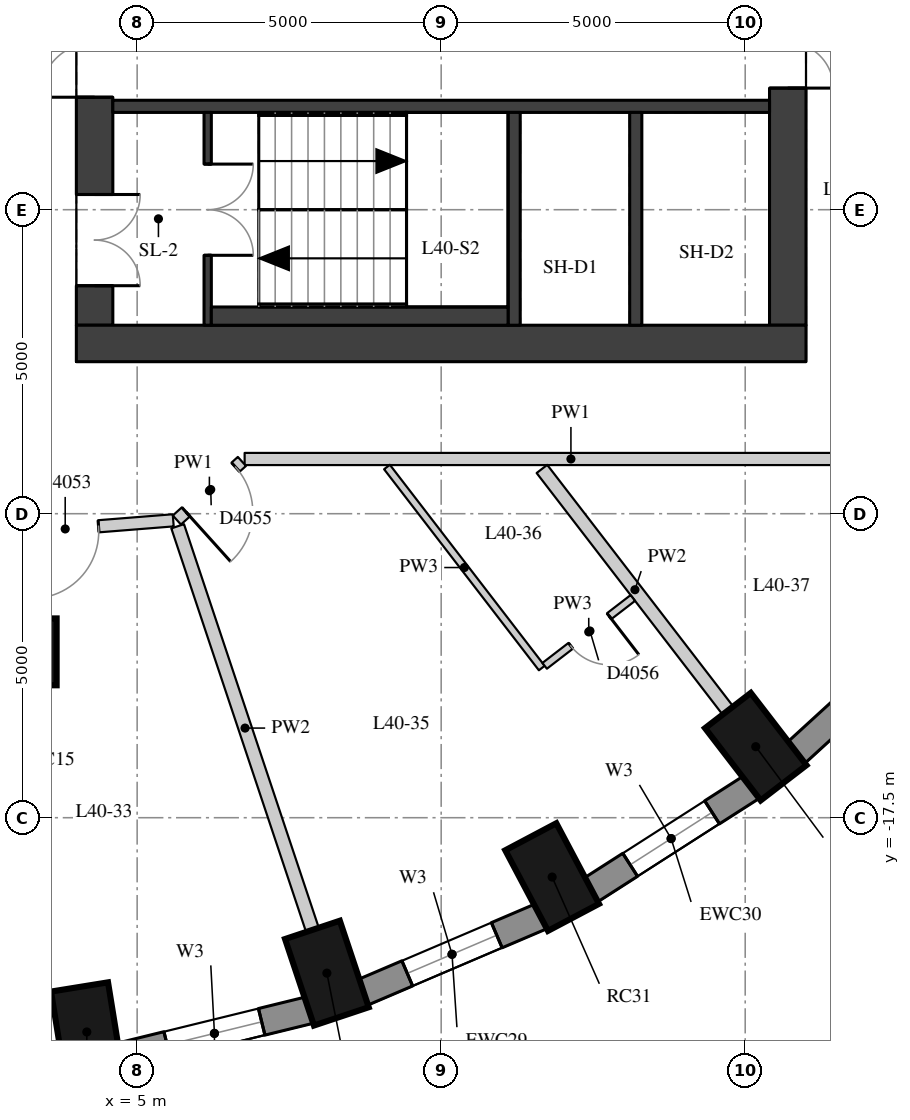
"""IFC4 building model, lengths in metres.
Left out: names, types, materials, properties, quantities, classifications, styles, units other than length and angle.
Written with IfcOpenShell. Run it as: python <this file> out.ifc"""

import sys

from ifc_helpers import new_model, si_unit, direction, frame, frame_2d, origin, origin_2d, place, context, subcontext, project, spatial, rectangle, extrude, element, fill, save


model = new_model("IFC4")
c1 = context("Model", 3, precision=1e-05, world=origin(), true_north=direction((0.0, 1.0)))
c2 = subcontext(c1, "Body", "Model", "MODEL_VIEW")
j1 = project(units=[si_unit("LENGTHUNIT", "METRE"), si_unit("PLANEANGLEUNIT", "RADIAN")], contexts=[c1])
p1 = place(None, origin())
s1 = spatial("IfcSite", under=j1, at=p1, CompositionType="ELEMENT")
p2 = place(p1, origin())
s2 = spatial("IfcBuilding", under=s1, at=p2, CompositionType="ELEMENT")
p3 = place(p2, frame((0.0, 0.0, 145.1)))
s3 = spatial("IfcBuildingStorey", under=s2, at=p3, CompositionType="ELEMENT", Elevation=145.1)
for number, where, z_axis, x_axis in (
    (1, (4.172, -21.024, 0.0), (0.0, 0.0, 1.0), (0.16, -0.987, 0.0)),
    (2, (8.12, -20.056, 0.0), (0.0, 0.0, 1.0), (0.317, -0.949, 0.0)),
    (3, (11.825, -18.476, 0.0), (0.0, 0.0, 1.0), (0.468, -0.884, 0.0)),
    (4, (15.173, -16.332, 0.0), (0.0, 0.0, 1.0), (0.61, -0.792, 0.0)),
):
    element("IfcColumn", number, at=place(p3, frame(where, z_axis=z_axis, x_axis=x_axis)), inside=s3, PredefinedType="COLUMN", context=c2, shape_type="SweptSolid", body=[
        extrude(rectangle(XDim=1.5, YDim=0.95, at=origin_2d()), origin(), (0.0, 0.0, 1.0), 3.3),
    ])
p4 = place(p3, frame((3.126, -14.772, 0.0), z_axis=(0.0, 0.0, 1.0), x_axis=(1.0, 0.0, 0.0)))
e5 = element("IfcColumn", 5, at=p4, inside=s3, PredefinedType="COLUMN", context=c2, shape_type="SweptSolid", body=[
    extrude(rectangle(XDim=1.1, YDim=1.1, at=origin_2d()), origin(), (0.0, 0.0, 1.0), 3.3),
])
p5 = place(p3, frame((4.699, -21.433, 0.0), z_axis=(0.0, 0.0, 1.0), x_axis=(0.971237178372, 0.238114139328, 0.0)))
e6 = element("IfcWall", 6, at=p5, inside=s3, PredefinedType="SOLIDWALL", context=c2, shape_type="SweptSolid", body=[
    extrude(rectangle(XDim=3.237, YDim=0.45, at=frame_2d((1.618, 0.0))), origin(), (0.0, 0.0, 1.0), 3.02),
])
p6 = place(p5, frame((0.818, 0.0, 0.4)))
e7 = element("IfcOpeningElement", 7, at=p6, cuts=e6, PredefinedType="OPENING", context=c2, shape_type="SweptSolid", body=[
    extrude(rectangle(XDim=1.6, YDim=1.75, at=frame_2d((0.8, 0.875))), frame((0.0, 0.235, 0.0), z_axis=(0.0, -1.0, 0.0), x_axis=(1.0, 0.0, 0.0)), (0.0, 0.0, 1.0), 0.47),
])
p7 = place(p3, frame((8.706, -20.375, 0.0), z_axis=(0.0, 0.0, 1.0), x_axis=(0.91981046949, 0.392362969986, 0.0)))
e8 = element("IfcWall", 8, at=p7, inside=s3, PredefinedType="SOLIDWALL", context=c2, shape_type="SweptSolid", body=[
    extrude(rectangle(XDim=3.201, YDim=0.45, at=frame_2d((1.6, 0.0))), origin(), (0.0, 0.0, 1.0), 3.02),
])
p8 = place(p7, frame((0.8, 0.0, 0.4)))
e9 = element("IfcOpeningElement", 9, at=p8, cuts=e8, PredefinedType="OPENING", context=c2, shape_type="SweptSolid", body=[
    extrude(rectangle(XDim=1.6, YDim=1.75, at=frame_2d((0.8, 0.875))), frame((0.0, 0.235, 0.0), z_axis=(0.0, -1.0, 0.0), x_axis=(1.0, 0.0, 0.0)), (0.0, 0.0, 1.0), 0.47),
])
p9 = place(p3, frame((12.455, -18.693, 0.0), z_axis=(0.0, 0.0, 1.0), x_axis=(0.842065914439, 0.539374633943, 0.0)))
e10 = element("IfcWall", 10, at=p9, inside=s3, PredefinedType="SOLIDWALL", context=c2, shape_type="SweptSolid", body=[
    extrude(rectangle(XDim=3.151, YDim=0.45, at=frame_2d((1.576, 0.0))), origin(), (0.0, 0.0, 1.0), 3.02),
])
p10 = place(p9, frame((0.776, 0.0, 0.4)))
e11 = element("IfcOpeningElement", 11, at=p10, cuts=e10, PredefinedType="OPENING", context=c2, shape_type="SweptSolid", body=[
    extrude(rectangle(XDim=1.6, YDim=1.75, at=frame_2d((0.8, 0.875))), frame((0.0, 0.235, 0.0), z_axis=(0.0, -1.0, 0.0), x_axis=(1.0, 0.0, 0.0)), (0.0, 0.0, 1.0), 0.47),
])
p11 = place(p3, frame((15.83, -16.439, 0.0), z_axis=(0.0, 0.0, 1.0), x_axis=(0.737808755941, 0.675009807082, 0.0)))
e12 = element("IfcWall", 12, at=p11, inside=s3, PredefinedType="SOLIDWALL", context=c2, shape_type="SweptSolid", body=[
    extrude(rectangle(XDim=3.094, YDim=0.45, at=frame_2d((1.547, 0.0))), origin(), (0.0, 0.0, 1.0), 3.02),
])
p12 = place(p3, frame((4.3, -9.4, 0.0), z_axis=(0.0, 0.0, 1.0), x_axis=(0.0, 1.0, 0.0)))
e13 = element("IfcWall", 13, at=p12, inside=s3, PredefinedType="SHEAR", context=c2, shape_type="SweptSolid", body=[
    extrude(rectangle(XDim=18.8, YDim=0.6, at=frame_2d((9.4, 0.0))), origin(), (0.0, 0.0, 1.0), 3.02),
])
p13 = place(p12, frame((0.65, 0.0, 0.0)))
e14 = element("IfcOpeningElement", 14, at=p13, cuts=e13, PredefinedType="OPENING", context=c2, shape_type="SweptSolid", body=[
    extrude(rectangle(XDim=1.5, YDim=2.1, at=frame_2d((0.75, 1.05))), frame((0.0, 0.31, 0.0), z_axis=(0.0, -1.0, 0.0), x_axis=(1.0, 0.0, 0.0)), (0.0, 0.0, 1.0), 0.62),
])
p14 = place(p12, frame((3.75, 0.0, 0.0)))
e15 = element("IfcOpeningElement", 15, at=p14, cuts=e13, PredefinedType="OPENING", context=c2, shape_type="SweptSolid", body=[
    extrude(rectangle(XDim=1.8, YDim=2.1, at=frame_2d((0.9, 1.05))), frame((0.0, 0.31, 0.0), z_axis=(0.0, -1.0, 0.0), x_axis=(1.0, 0.0, 0.0)), (0.0, 0.0, 1.0), 0.62),
])
p15 = place(p12, frame((6.25, 0.0, 0.0)))
e16 = element("IfcOpeningElement", 16, at=p15, cuts=e13, PredefinedType="OPENING", context=c2, shape_type="SweptSolid", body=[
    extrude(rectangle(XDim=1.1, YDim=2.1, at=frame_2d((0.55, 1.05))), frame((0.0, 0.31, 0.0), z_axis=(0.0, -1.0, 0.0), x_axis=(1.0, 0.0, 0.0)), (0.0, 0.0, 1.0), 0.62),
])
p16 = place(p12, frame((8.9, 0.0, 0.0)))
e17 = element("IfcOpeningElement", 17, at=p16, cuts=e13, PredefinedType="OPENING", context=c2, shape_type="SweptSolid", body=[
    extrude(rectangle(XDim=1.0, YDim=2.1, at=frame_2d((0.5, 1.05))), frame((0.0, 0.31, 0.0), z_axis=(0.0, -1.0, 0.0), x_axis=(1.0, 0.0, 0.0)), (0.0, 0.0, 1.0), 0.62),
])
p17 = place(p12, frame((11.45, 0.0, 0.0)))
e18 = element("IfcOpeningElement", 18, at=p17, cuts=e13, PredefinedType="OPENING", context=c2, shape_type="SweptSolid", body=[
    extrude(rectangle(XDim=1.1, YDim=2.1, at=frame_2d((0.55, 1.05))), frame((0.0, 0.31, 0.0), z_axis=(0.0, -1.0, 0.0), x_axis=(1.0, 0.0, 0.0)), (0.0, 0.0, 1.0), 0.62),
])
p18 = place(p12, frame((13.25, 0.0, 0.0)))
e19 = element("IfcOpeningElement", 19, at=p18, cuts=e13, PredefinedType="OPENING", context=c2, shape_type="SweptSolid", body=[
    extrude(rectangle(XDim=1.8, YDim=2.1, at=frame_2d((0.9, 1.05))), frame((0.0, 0.31, 0.0), z_axis=(0.0, -1.0, 0.0), x_axis=(1.0, 0.0, 0.0)), (0.0, 0.0, 1.0), 0.62),
])
p19 = place(p12, frame((16.65, 0.0, 0.0)))
e20 = element("IfcOpeningElement", 20, at=p19, cuts=e13, PredefinedType="OPENING", context=c2, shape_type="SweptSolid", body=[
    extrude(rectangle(XDim=1.5, YDim=2.1, at=frame_2d((0.75, 1.05))), frame((0.0, 0.31, 0.0), z_axis=(0.0, -1.0, 0.0), x_axis=(1.0, 0.0, 0.0)), (0.0, 0.0, 1.0), 0.62),
])
p20 = place(p3, frame((15.7, -9.4, 0.0), z_axis=(0.0, 0.0, 1.0), x_axis=(0.0, 1.0, 0.0)))
e21 = element("IfcWall", 21, at=p20, inside=s3, PredefinedType="SHEAR", context=c2, shape_type="SweptSolid", body=[
    extrude(rectangle(XDim=18.8, YDim=0.6, at=frame_2d((9.4, 0.0))), origin(), (0.0, 0.0, 1.0), 3.02),
])
p21 = place(p20, frame((13.4, 0.0, 0.0)))
e22 = element("IfcOpeningElement", 22, at=p21, cuts=e21, PredefinedType="OPENING", context=c2, shape_type="SweptSolid", body=[
    extrude(rectangle(XDim=1.5, YDim=2.1, at=frame_2d((0.75, 1.05))), frame((0.0, 0.31, 0.0), z_axis=(0.0, -1.0, 0.0), x_axis=(1.0, 0.0, 0.0)), (0.0, 0.0, 1.0), 0.62),
])
p22 = place(p20, frame((3.9, 0.0, 0.0)))
e23 = element("IfcOpeningElement", 23, at=p22, cuts=e21, PredefinedType="OPENING", context=c2, shape_type="SweptSolid", body=[
    extrude(rectangle(XDim=1.5, YDim=2.1, at=frame_2d((0.75, 1.05))), frame((0.0, 0.31, 0.0), z_axis=(0.0, -1.0, 0.0), x_axis=(1.0, 0.0, 0.0)), (0.0, 0.0, 1.0), 0.62),
])
p23 = place(p3, frame((4.0, -9.7, 0.0), z_axis=(0.0, 0.0, 1.0), x_axis=(1.0, 0.0, 0.0)))
e24 = element("IfcWall", 24, at=p23, inside=s3, PredefinedType="SHEAR", context=c2, shape_type="SweptSolid", body=[
    extrude(rectangle(XDim=12.0, YDim=0.6, at=frame_2d((6.0, 0.0))), origin(), (0.0, 0.0, 1.0), 3.02),
])
p24 = place(p3, frame((4.6, -5.8, 0.0), z_axis=(0.0, 0.0, 1.0), x_axis=(1.0, 0.0, 0.0)))
e25 = element("IfcWall", 25, at=p24, inside=s3, PredefinedType="SHEAR", context=c2, shape_type="SweptSolid", body=[
    extrude(rectangle(XDim=10.8, YDim=0.2, at=frame_2d((5.4, 0.0))), origin(), (0.0, 0.0, 1.0), 3.02),
])
for number, where, z_axis, x_axis in (
    (26, (11.2, -9.4, 0.0), (0.0, 0.0, 1.0), (0.0, 1.0, 0.0)),
    (27, (13.2, -9.4, 0.0), (0.0, 0.0, 1.0), (0.0, 1.0, 0.0)),
):
    element("IfcWall", number, at=place(p3, frame(where, z_axis=z_axis, x_axis=x_axis)), inside=s3, PredefinedType="SHEAR", context=c2, shape_type="SweptSolid", body=[
        extrude(rectangle(XDim=3.5, YDim=0.2, at=frame_2d((1.75, 0.0))), origin(), (0.0, 0.0, 1.0), 3.02),
    ])
p25 = place(p3, frame((6.16, -9.4, 0.0), z_axis=(0.0, 0.0, 1.0), x_axis=(0.0, 1.0, 0.0)))
e28 = element("IfcWall", 28, at=p25, inside=s3, PredefinedType="SHEAR", context=c2, shape_type="SweptSolid", body=[
    extrude(rectangle(XDim=3.5, YDim=0.12, at=frame_2d((1.75, 0.0))), origin(), (0.0, 0.0, 1.0), 3.02),
])
p26 = place(p25, frame((1.15, 0.0, 0.0)))
e29 = element("IfcOpeningElement", 29, at=p26, cuts=e28, PredefinedType="OPENING", context=c2, shape_type="SweptSolid", body=[
    extrude(rectangle(XDim=1.5, YDim=2.1, at=frame_2d((0.75, 1.05))), frame((0.0, 0.07, 0.0), z_axis=(0.0, -1.0, 0.0), x_axis=(1.0, 0.0, 0.0)), (0.0, 0.0, 1.0), 0.14),
])
p27 = place(p3, frame((6.22, -9.25, 0.0), z_axis=(0.0, 0.0, 1.0), x_axis=(1.0, 0.0, 0.0)))
e30 = element("IfcWall", 30, at=p27, inside=s3, PredefinedType="PARTITIONING", context=c2, shape_type="SweptSolid", body=[
    extrude(rectangle(XDim=4.88, YDim=0.3, at=frame_2d((2.44, 0.0))), origin(), (0.0, 0.0, 1.0), 3.02),
])
p28 = place(p3, frame((17.5, -11.6, 0.0), z_axis=(0.0, 0.0, 1.0), x_axis=(-1.0, 0.0, 0.0)))
e31 = element("IfcWall", 31, at=p28, inside=s3, PredefinedType="PARTITIONING", context=c2, shape_type="SweptSolid", body=[
    extrude(rectangle(XDim=10.732, YDim=0.2, at=frame_2d((5.366, 0.0))), origin(), (0.0, 0.0, 1.0), 3.02),
])
p29 = place(p3, frame((6.723, -11.64, 0.0), z_axis=(0.0, 0.0, 1.0), x_axis=(-0.743032656565, -0.669255161562, 0.0)))
e32 = element("IfcWall", 32, at=p29, inside=s3, PredefinedType="PARTITIONING", context=c2, shape_type="SweptSolid", body=[
    extrude(rectangle(XDim=1.439, YDim=0.2, at=frame_2d((0.72, 0.0))), origin(), (0.0, 0.0, 1.0), 3.02),
])
p30 = place(p29, frame((0.14, 0.0, 0.0)))
e33 = element("IfcOpeningElement", 33, at=p30, cuts=e32, PredefinedType="OPENING", context=c2, shape_type="SweptSolid", body=[
    extrude(rectangle(XDim=1.1, YDim=2.1, at=frame_2d((0.55, 1.05))), frame((0.0, 0.11, 0.0), z_axis=(0.0, -1.0, 0.0), x_axis=(1.0, 0.0, 0.0)), (0.0, 0.0, 1.0), 0.22),
])
p31 = place(p3, frame((5.593, -12.609, 0.0), z_axis=(0.0, 0.0, 1.0), x_axis=(-0.99682930336, -0.079569717626, 0.0)))
e34 = element("IfcWall", 34, at=p31, inside=s3, PredefinedType="PARTITIONING", context=c2, shape_type="SweptSolid", body=[
    extrude(rectangle(XDim=8.349, YDim=0.2, at=frame_2d((4.174, 0.0))), origin(), (0.0, 0.0, 1.0), 3.02),
])
p32 = place(p31, frame((1.232, 0.0, 0.0)))
e35 = element("IfcOpeningElement", 35, at=p32, cuts=e34, PredefinedType="OPENING", context=c2, shape_type="SweptSolid", body=[
    extrude(rectangle(XDim=1.1, YDim=2.1, at=frame_2d((0.55, 1.05))), frame((0.0, 0.11, 0.0), z_axis=(0.0, -1.0, 0.0), x_axis=(1.0, 0.0, 0.0)), (0.0, 0.0, 1.0), 0.22),
])
p33 = place(p3, frame((7.883, -19.345, 0.0), z_axis=(0.0, 0.0, 1.0), x_axis=(-0.31671959997, 0.948519211716, 0.0)))
e36 = element("IfcWall", 36, at=p33, inside=s3, PredefinedType="PARTITIONING", context=c2, shape_type="SweptSolid", body=[
    extrude(rectangle(XDim=6.999, YDim=0.22, at=frame_2d((3.499, 0.0))), origin(), (0.0, 0.0, 1.0), 3.02),
])
p34 = place(p3, frame((14.716, -15.737, 0.0), z_axis=(0.0, 0.0, 1.0), x_axis=(-0.609986007715, 0.792412184657, 0.0)))
e37 = element("IfcWall", 37, at=p34, inside=s3, PredefinedType="PARTITIONING", context=c2, shape_type="SweptSolid", body=[
    extrude(rectangle(XDim=5.015, YDim=0.22, at=frame_2d((2.507, 0.0))), origin(), (0.0, 0.0, 1.0), 3.02),
])
p35 = place(p3, frame((9.109, -11.732, 0.0), z_axis=(0.0, 0.0, 1.0), x_axis=(0.609996270026, -0.79240428479, 0.0)))
e38 = element("IfcWall", 38, at=p35, inside=s3, PredefinedType="PARTITIONING", context=c2, shape_type="SweptSolid", body=[
    extrude(rectangle(XDim=4.173, YDim=0.12, at=frame_2d((2.087, 0.0))), origin(), (0.0, 0.0, 1.0), 3.02),
])
p36 = place(p3, frame((11.702, -15.002, 0.0), z_axis=(0.0, 0.0, 1.0), x_axis=(0.792395776304, 0.610007322657, 0.0)))
e39 = element("IfcWall", 39, at=p36, inside=s3, PredefinedType="PARTITIONING", context=c2, shape_type="SweptSolid", body=[
    extrude(rectangle(XDim=1.83, YDim=0.12, at=frame_2d((0.915, 0.0))), origin(), (0.0, 0.0, 1.0), 3.02),
])
p37 = place(p36, frame((0.54, 0.0, 0.0)))
e40 = element("IfcOpeningElement", 40, at=p37, cuts=e39, PredefinedType="OPENING", context=c2, shape_type="SweptSolid", body=[
    extrude(rectangle(XDim=0.8, YDim=2.1, at=frame_2d((0.4, 1.05))), frame((0.0, 0.07, 0.0), z_axis=(0.0, -1.0, 0.0), x_axis=(1.0, 0.0, 0.0)), (0.0, 0.0, 1.0), 0.14),
])
p38 = place(p6, origin())
e41 = element("IfcWindow", 41, at=p38, inside=s3, PartitioningType="SINGLE_PANEL", PredefinedType="WINDOW", context=c2, shape_type="SweptSolid", body=[
    extrude(rectangle(XDim=1.6, YDim=1.75, at=frame_2d((0.8, 0.875))), frame((0.0, 0.035, 0.0), z_axis=(0.0, -1.0, 0.0), x_axis=(1.0, 0.0, 0.0)), (0.0, 0.0, 1.0), 0.06),
])
fill(e7, e41)
p39 = place(p8, origin())
e42 = element("IfcWindow", 42, at=p39, inside=s3, PartitioningType="SINGLE_PANEL", PredefinedType="WINDOW", context=c2, shape_type="SweptSolid", body=[
    extrude(rectangle(XDim=1.6, YDim=1.75, at=frame_2d((0.8, 0.875))), frame((0.0, 0.035, 0.0), z_axis=(0.0, -1.0, 0.0), x_axis=(1.0, 0.0, 0.0)), (0.0, 0.0, 1.0), 0.06),
])
fill(e9, e42)
p40 = place(p10, origin())
e43 = element("IfcWindow", 43, at=p40, inside=s3, PartitioningType="SINGLE_PANEL", PredefinedType="WINDOW", context=c2, shape_type="SweptSolid", body=[
    extrude(rectangle(XDim=1.6, YDim=1.75, at=frame_2d((0.8, 0.875))), frame((0.0, 0.035, 0.0), z_axis=(0.0, -1.0, 0.0), x_axis=(1.0, 0.0, 0.0)), (0.0, 0.0, 1.0), 0.06),
])
fill(e11, e43)
p41 = place(p13, origin())
e44 = element("IfcDoor", 44, at=p41, inside=s3, OperationType="DOUBLE_DOOR_SINGLE_SWING", PredefinedType="DOOR", context=c2, shape_type="SweptSolid", body=[
    extrude(rectangle(XDim=1.5, YDim=2.1, at=frame_2d((0.75, 1.05))), frame((0.0, 0.025, 0.0), z_axis=(0.0, -1.0, 0.0), x_axis=(1.0, 0.0, 0.0)), (0.0, 0.0, 1.0), 0.05),
])
fill(e14, e44)
p42 = place(p14, origin())
e45 = element("IfcDoor", 45, at=p42, inside=s3, OperationType="DOUBLE_DOOR_SINGLE_SWING", PredefinedType="DOOR", context=c2, shape_type="SweptSolid", body=[
    extrude(rectangle(XDim=1.8, YDim=2.1, at=frame_2d((0.9, 1.05))), frame((0.0, 0.025, 0.0), z_axis=(0.0, -1.0, 0.0), x_axis=(1.0, 0.0, 0.0)), (0.0, 0.0, 1.0), 0.05),
])
fill(e15, e45)
p43 = place(p22, origin())
e46 = element("IfcDoor", 46, at=p43, inside=s3, OperationType="DOUBLE_DOOR_SINGLE_SWING", PredefinedType="DOOR", context=c2, shape_type="SweptSolid", body=[
    extrude(rectangle(XDim=1.5, YDim=2.1, at=frame_2d((0.75, 1.05))), frame((0.0, 0.025, 0.0), z_axis=(0.0, -1.0, 0.0), x_axis=(1.0, 0.0, 0.0)), (0.0, 0.0, 1.0), 0.05),
])
fill(e23, e46)
p44 = place(p26, origin())
e47 = element("IfcDoor", 47, at=p44, inside=s3, OperationType="DOUBLE_DOOR_SINGLE_SWING", PredefinedType="DOOR", context=c2, shape_type="SweptSolid", body=[
    extrude(rectangle(XDim=1.5, YDim=2.1, at=frame_2d((0.75, 1.05))), frame((0.0, 0.025, 0.0), z_axis=(0.0, -1.0, 0.0), x_axis=(1.0, 0.0, 0.0)), (0.0, 0.0, 1.0), 0.05),
])
fill(e29, e47)
p45 = place(p32, origin())
e48 = element("IfcDoor", 48, at=p45, inside=s3, OperationType="SINGLE_SWING_RIGHT", PredefinedType="DOOR", context=c2, shape_type="SweptSolid", body=[
    extrude(rectangle(XDim=1.1, YDim=2.1, at=frame_2d((0.55, 1.05))), frame((0.0, 0.025, 0.0), z_axis=(0.0, -1.0, 0.0), x_axis=(1.0, 0.0, 0.0)), (0.0, 0.0, 1.0), 0.05),
])
fill(e35, e48)
p46 = place(p30, origin())
e49 = element("IfcDoor", 49, at=p46, inside=s3, OperationType="SINGLE_SWING_RIGHT", PredefinedType="DOOR", context=c2, shape_type="SweptSolid", body=[
    extrude(rectangle(XDim=1.1, YDim=2.1, at=frame_2d((0.55, 1.05))), frame((0.0, 0.025, 0.0), z_axis=(0.0, -1.0, 0.0), x_axis=(1.0, 0.0, 0.0)), (0.0, 0.0, 1.0), 0.05),
])
fill(e33, e49)
p47 = place(p37, origin())
e50 = element("IfcDoor", 50, at=p47, inside=s3, OperationType="SINGLE_SWING_LEFT", PredefinedType="DOOR", context=c2, shape_type="SweptSolid", body=[
    extrude(rectangle(XDim=0.8, YDim=2.1, at=frame_2d((0.4, 1.05))), frame((0.0, 0.025, 0.0), z_axis=(0.0, -1.0, 0.0), x_axis=(1.0, 0.0, 0.0)), (0.0, 0.0, 1.0), 0.05),
])
fill(e40, e50)
save(model, sys.argv[1])
